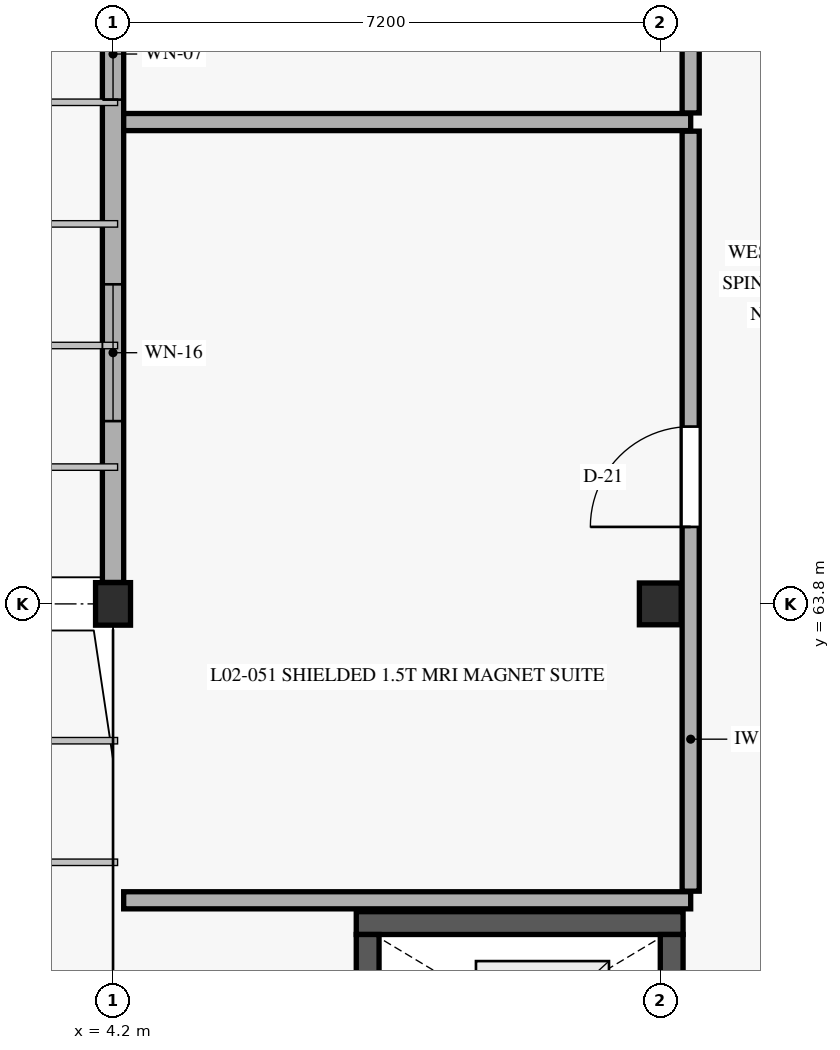
"""IFC4 building model, lengths in metres.
Left out: names, types, materials, properties, quantities, classifications, styles, units other than length and angle.
Written with IfcOpenShell. Run it as: python <this file> out.ifc"""

import sys

from ifc_helpers import new_model, si_unit, direction, frame, frame_2d, origin, origin_with_axes, origin_2d, place, context, subcontext, project, spatial, rectangle, extrude, element, fill, save


model = new_model("IFC4")
c1 = context("Model", 3, precision=1e-05, world=origin(), true_north=direction((0.0, 1.0)))
c2 = subcontext(c1, "Body", "Model", "MODEL_VIEW")
j1 = project(units=[si_unit("LENGTHUNIT", "METRE"), si_unit("PLANEANGLEUNIT", "RADIAN")], contexts=[c1])
p1 = place(None, origin())
s1 = spatial("IfcSite", under=j1, at=p1, CompositionType="ELEMENT")
p2 = place(p1, origin())
s2 = spatial("IfcBuilding", under=s1, at=p2, CompositionType="ELEMENT")
p3 = place(p2, frame((0.0, 0.0, 4.8)))
s3 = spatial("IfcBuildingStorey", under=s2, at=p3, CompositionType="ELEMENT", Elevation=4.8)
p4 = place(p3, frame((4.2, 63.8, 0.0), z_axis=(0.0, 0.0, 1.0), x_axis=(1.0, 0.0, 0.0)))
e1 = element("IfcColumn", 1, at=p4, inside=s3, PredefinedType="COLUMN", context=c2, shape_type="SweptSolid", body=[
    extrude(rectangle(XDim=0.46, YDim=0.56, at=origin_2d()), origin(), (0.0, 0.0, 1.0), 4.5),
])
p5 = place(p3, frame((11.4, 63.8, 0.0), z_axis=(0.0, 0.0, 1.0), x_axis=(1.0, 0.0, 0.0)))
e2 = element("IfcColumn", 2, at=p5, inside=s3, PredefinedType="COLUMN", context=c2, shape_type="SweptSolid", body=[
    extrude(rectangle(XDim=0.55, YDim=0.55, at=origin_2d()), origin(), (0.0, 0.0, 1.0), 4.5),
])
p6 = place(p3, frame((11.7, 59.6, 0.0), z_axis=(0.0, 0.0, 1.0), x_axis=(-1.0, 0.0, 0.0)))
e3 = element("IfcWall", 3, at=p6, inside=s3, PredefinedType="SHEAR", context=c2, shape_type="SweptSolid", body=[
    extrude(rectangle(XDim=4.3, YDim=0.3, at=frame_2d((2.15, 0.0))), origin(), (0.0, 0.0, 1.0), 4.2),
])
p7 = place(p3, frame((7.55, 59.45, 0.0), z_axis=(0.0, 0.0, 1.0), x_axis=(0.0, -1.0, 0.0)))
e4 = element("IfcWall", 4, at=p7, inside=s3, PredefinedType="SHEAR", context=c2, shape_type="SweptSolid", body=[
    extrude(rectangle(XDim=9.5, YDim=0.3, at=frame_2d((4.75, 0.0))), origin(), (0.0, 0.0, 1.0), 4.2),
])
p8 = place(p3, frame((11.55, 49.95, 0.0), z_axis=(0.0, 0.0, 1.0), x_axis=(0.0, 1.0, 0.0)))
e5 = element("IfcWall", 5, at=p8, inside=s3, PredefinedType="SHEAR", context=c2, shape_type="SweptSolid", body=[
    extrude(rectangle(XDim=9.5, YDim=0.3, at=frame_2d((4.75, 0.0))), origin(), (0.0, 0.0, 1.0), 4.2),
])
p9 = place(p8, frame((0.2, 0.0, 0.0)))
e6 = element("IfcOpeningElement", 6, at=p9, cuts=e5, PredefinedType="OPENING", context=c2, shape_type="SweptSolid", body=[
    extrude(rectangle(XDim=1.1, YDim=2.2, at=frame_2d((0.55, 1.1))), frame((0.0, 0.16, 0.0), z_axis=(0.0, -1.0, 0.0), x_axis=(1.0, 0.0, 0.0)), (0.0, 0.0, 1.0), 0.32),
])
p10 = place(p8, frame((7.84, 0.0, 0.0)))
e7 = element("IfcOpeningElement", 7, at=p10, cuts=e5, PredefinedType="OPENING", context=c2, shape_type="SweptSolid", body=[
    extrude(rectangle(XDim=1.02, YDim=2.15, at=frame_2d((0.51, 1.075))), frame((0.0, 0.16, 0.0), z_axis=(0.0, -1.0, 0.0), x_axis=(1.0, 0.0, 0.0)), (0.0, 0.0, 1.0), 0.32),
])
p11 = place(p3, frame((4.2, 71.918, 0.0), z_axis=(0.0, 0.0, 1.0), x_axis=(0.0, -1.0, 0.0)))
e8 = element("IfcWall", 8, at=p11, inside=s3, PredefinedType="SOLIDWALL", context=c2, shape_type="SweptSolid", body=[
    extrude(rectangle(XDim=7.836, YDim=0.28, at=frame_2d((3.918, 0.0))), origin(), (0.0, 0.0, 1.0), 3.65),
])
p12 = place(p11, frame((0.283, 0.0, 0.88)))
e9 = element("IfcOpeningElement", 9, at=p12, cuts=e8, PredefinedType="OPENING", context=c2, shape_type="SweptSolid", body=[
    extrude(rectangle(XDim=1.2, YDim=1.85, at=frame_2d((0.6, 0.925))), frame((0.0, 0.15, 0.0), z_axis=(0.0, -1.0, 0.0), x_axis=(1.0, 0.0, 0.0)), (0.0, 0.0, 1.0), 0.3),
])
p13 = place(p11, frame((3.913, 0.0, 0.88)))
e10 = element("IfcOpeningElement", 10, at=p13, cuts=e8, PredefinedType="OPENING", context=c2, shape_type="SweptSolid", body=[
    extrude(rectangle(XDim=1.8, YDim=2.05, at=frame_2d((0.9, 1.025))), frame((0.0, 0.15, 0.0), z_axis=(0.0, -1.0, 0.0), x_axis=(1.0, 0.0, 0.0)), (0.0, 0.0, 1.0), 0.3),
])
p14 = place(p3, frame((11.8, 60.02, 0.0), z_axis=(0.0, 0.0, 1.0), x_axis=(0.0, 1.0, 0.0)))
e11 = element("IfcWall", 11, at=p14, inside=s3, PredefinedType="SOLIDWALL", context=c2, shape_type="SweptSolid", body=[
    extrude(rectangle(XDim=10.0, YDim=0.225, at=frame_2d((5.0, 0.0))), origin(), (0.0, 0.0, 1.0), 3.795),
])
p15 = place(p14, frame((4.793, 0.0, 0.0)))
e12 = element("IfcOpeningElement", 12, at=p15, cuts=e11, PredefinedType="OPENING", context=c2, shape_type="SweptSolid", body=[
    extrude(rectangle(XDim=1.32, YDim=2.3, at=frame_2d((0.66, 1.15))), frame((0.0, 0.123, 0.0), z_axis=(0.0, -1.0, 0.0), x_axis=(1.0, 0.0, 0.0)), (0.0, 0.0, 1.0), 0.245),
])
for number, where, z_axis, x_axis in (
    (13, (4.34, 70.14, 0.0), (0.0, 0.0, 1.0), (1.0, 0.0, 0.0)),
    (14, (4.34, 59.9, 0.0), (0.0, 0.0, 1.0), (1.0, 0.0, 0.0)),
):
    element("IfcWall", number, at=place(p3, frame(where, z_axis=z_axis, x_axis=x_axis)), inside=s3, PredefinedType="SOLIDWALL", context=c2, shape_type="SweptSolid", body=[
        extrude(rectangle(XDim=7.46, YDim=0.225, at=frame_2d((3.73, 0.0))), origin(), (0.0, 0.0, 1.0), 3.645),
    ])
p16 = place(p3, frame((11.8, 70.26, 0.0), z_axis=(0.0, 0.0, 1.0), x_axis=(0.0, 1.0, 0.0)))
e15 = element("IfcWall", 15, at=p16, inside=s3, PredefinedType="SOLIDWALL", context=c2, shape_type="SweptSolid", body=[
    extrude(rectangle(XDim=7.9, YDim=0.225, at=frame_2d((3.95, 0.0))), origin(), (0.0, 0.0, 1.0), 4.195),
])
p17 = place(p16, frame((3.31, 0.0, 0.0)))
e16 = element("IfcOpeningElement", 16, at=p17, cuts=e15, PredefinedType="OPENING", context=c2, shape_type="SweptSolid", body=[
    extrude(rectangle(XDim=1.28, YDim=2.25, at=frame_2d((0.64, 1.125))), frame((0.0, 0.123, 0.0), z_axis=(0.0, -1.0, 0.0), x_axis=(1.0, 0.0, 0.0)), (0.0, 0.0, 1.0), 0.245),
])
p18 = place(p12, origin_with_axes())
e17 = element("IfcWindow", 17, at=p18, inside=s3, PartitioningType="SINGLE_PANEL", PredefinedType="WINDOW", context=c2, shape_type="SweptSolid", body=[
    extrude(rectangle(XDim=1.2, YDim=1.85, at=frame_2d((0.6, 0.925))), frame((0.0, 0.03, 0.0), z_axis=(0.0, -1.0, 0.0), x_axis=(1.0, 0.0, 0.0)), (0.0, 0.0, 1.0), 0.06),
])
fill(e9, e17)
p19 = place(p13, origin_with_axes())
e18 = element("IfcWindow", 18, at=p19, inside=s3, PartitioningType="SINGLE_PANEL", PredefinedType="WINDOW", context=c2, shape_type="SweptSolid", body=[
    extrude(rectangle(XDim=1.8, YDim=2.05, at=frame_2d((0.9, 1.025))), frame((0.0, 0.03, 0.0), z_axis=(0.0, -1.0, 0.0), x_axis=(1.0, 0.0, 0.0)), (0.0, 0.0, 1.0), 0.06),
])
fill(e10, e18)
p20 = place(p15, origin_with_axes())
e19 = element("IfcDoor", 19, at=p20, inside=s3, OperationType="SINGLE_SWING_LEFT", PredefinedType="DOOR", context=c2, shape_type="SweptSolid", body=[
    extrude(rectangle(XDim=1.32, YDim=2.3, at=frame_2d((0.66, 1.15))), frame((0.0, 0.025, 0.0), z_axis=(0.0, -1.0, 0.0), x_axis=(1.0, 0.0, 0.0)), (0.0, 0.0, 1.0), 0.05),
])
fill(e12, e19)
save(model, sys.argv[1])
